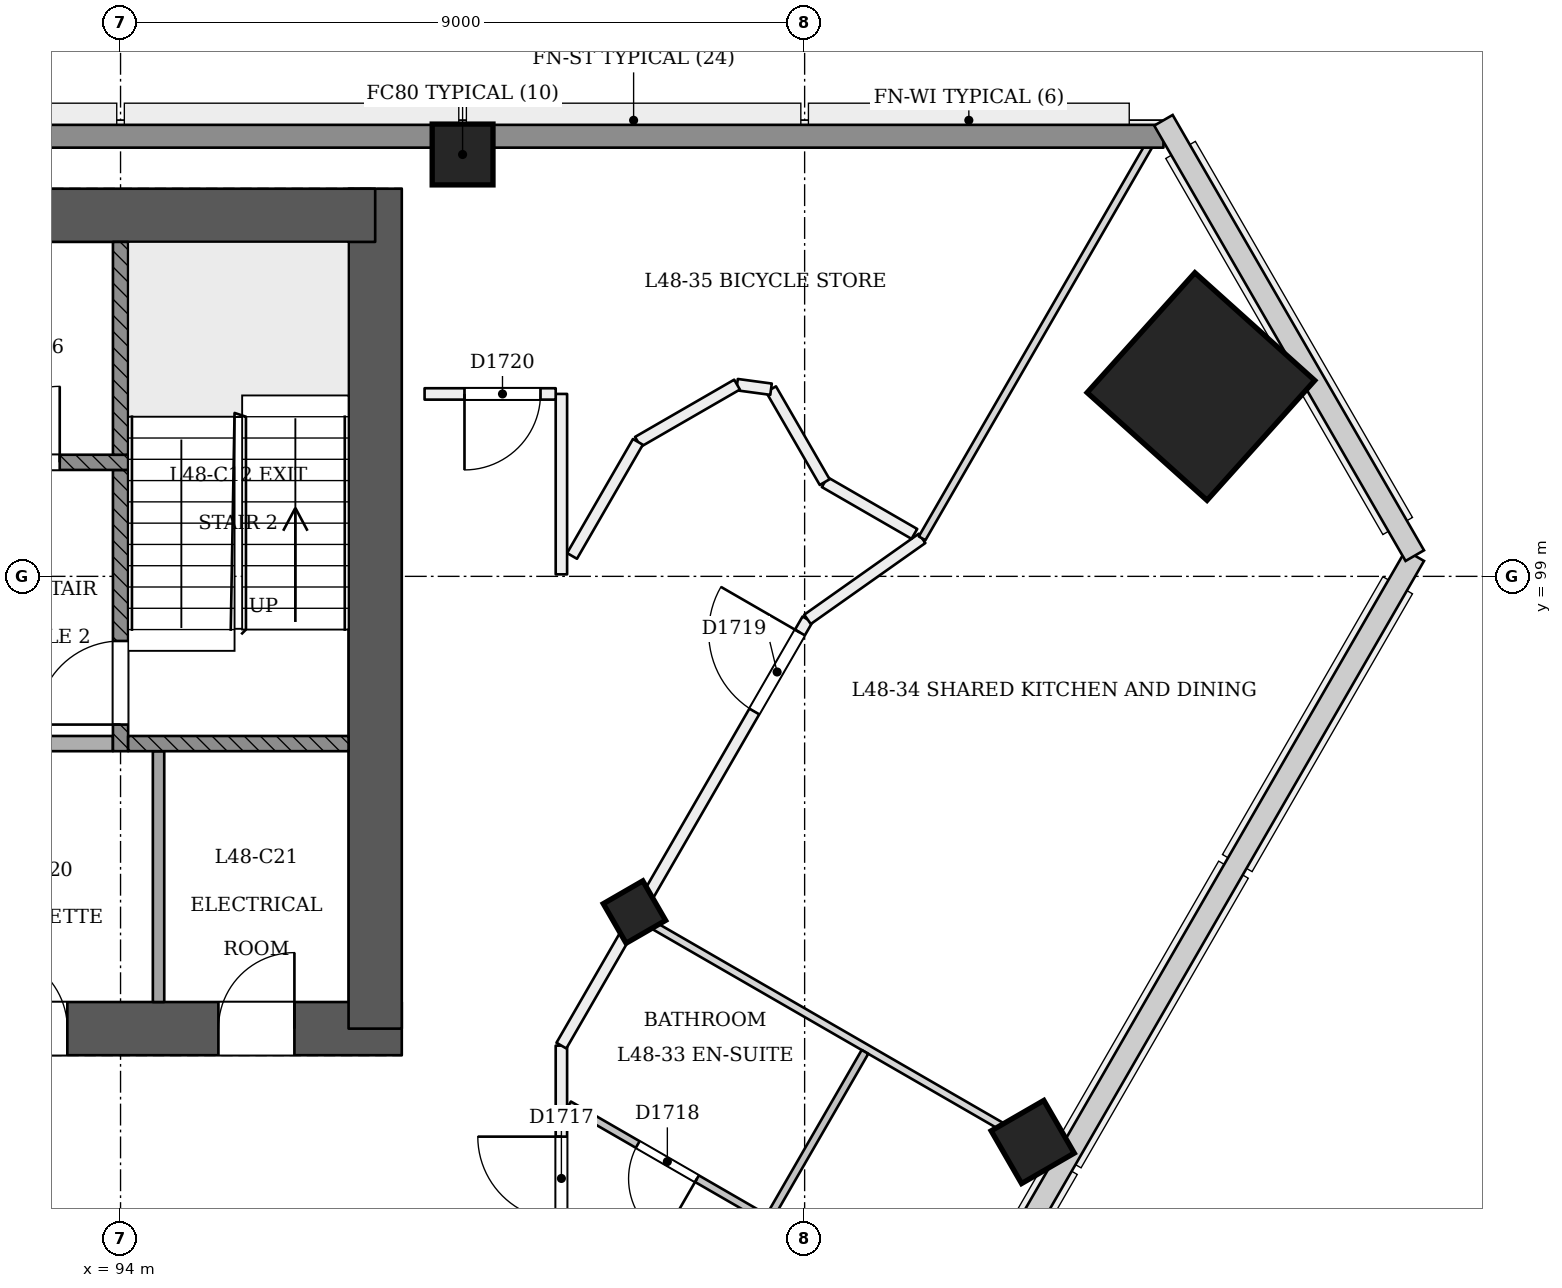
"""IFC4 building model, lengths in metres.
Left out: names, types, materials, properties, quantities, classifications, styles, units other than length and angle.
Written with IfcOpenShell. Run it as: python <this file> out.ifc"""

import sys

from ifc_helpers import new_model, si_unit, direction, frame, frame_2d, origin, origin_2d, place, context, subcontext, project, spatial, rectangle, extrude, element, fill, save


model = new_model("IFC4")
c1 = context("Model", 3, precision=1e-05, world=origin(), true_north=direction((0.0, 1.0)))
c2 = subcontext(c1, "Body", "Model", "MODEL_VIEW")
j1 = project(units=[si_unit("LENGTHUNIT", "METRE"), si_unit("PLANEANGLEUNIT", "RADIAN")], contexts=[c1])
p1 = place(None, origin())
s1 = spatial("IfcSite", under=j1, at=p1, CompositionType="ELEMENT")
p2 = place(p1, origin())
s2 = spatial("IfcBuilding", under=s1, at=p2, CompositionType="ELEMENT")
p3 = place(p2, frame((0.0, 0.0, 185.4)))
s3 = spatial("IfcBuildingStorey", under=s2, at=p3, CompositionType="ELEMENT", Elevation=185.4)
p4 = place(p3, frame((72.65, 93.05, 0.0), z_axis=(0.0, 0.0, 1.0), x_axis=(1.0, 0.0, 0.0)))
e1 = element("IfcWall", 1, at=p4, inside=s3, PredefinedType="SHEAR", context=c2, shape_type="SweptSolid", body=[
    extrude(rectangle(XDim=25.05, YDim=0.7, at=frame_2d((12.525, 0.0))), origin(), (0.0, 0.0, 1.0), 3.6),
])
p5 = place(p4, frame((1.15, 0.0, 0.0)))
e2 = element("IfcOpeningElement", 2, at=p5, cuts=e1, PredefinedType="OPENING", context=c2, shape_type="SweptSolid", body=[
    extrude(rectangle(XDim=1.2, YDim=2.1, at=frame_2d((0.6, 1.05))), frame((0.0, 0.36, 0.0), z_axis=(0.0, -1.0, 0.0), x_axis=(1.0, 0.0, 0.0)), (0.0, 0.0, 1.0), 0.721),
])
p6 = place(p4, frame((3.35, 0.0, 0.0)))
e3 = element("IfcOpeningElement", 3, at=p6, cuts=e1, PredefinedType="OPENING", context=c2, shape_type="SweptSolid", body=[
    extrude(rectangle(XDim=1.2, YDim=2.1, at=frame_2d((0.6, 1.05))), frame((0.0, 0.36, 0.0), z_axis=(0.0, -1.0, 0.0), x_axis=(1.0, 0.0, 0.0)), (0.0, 0.0, 1.0), 0.721),
])
p7 = place(p4, frame((13.35, 0.0, 0.0)))
e4 = element("IfcOpeningElement", 4, at=p7, cuts=e1, PredefinedType="OPENING", context=c2, shape_type="SweptSolid", body=[
    extrude(rectangle(XDim=1.2, YDim=2.1, at=frame_2d((0.6, 1.05))), frame((0.0, 0.36, 0.0), z_axis=(0.0, -1.0, 0.0), x_axis=(1.0, 0.0, 0.0)), (0.0, 0.0, 1.0), 0.721),
])
p8 = place(p4, frame((16.212, 0.0, 0.0)))
e5 = element("IfcOpeningElement", 5, at=p8, cuts=e1, PredefinedType="OPENING", context=c2, shape_type="SweptSolid", body=[
    extrude(rectangle(XDim=1.0, YDim=2.1, at=frame_2d((0.5, 1.05))), frame((0.0, 0.36, 0.0), z_axis=(0.0, -1.0, 0.0), x_axis=(1.0, 0.0, 0.0)), (0.0, 0.0, 1.0), 0.721),
])
p9 = place(p4, frame((19.65, 0.0, 0.0)))
e6 = element("IfcOpeningElement", 6, at=p9, cuts=e1, PredefinedType="OPENING", context=c2, shape_type="SweptSolid", body=[
    extrude(rectangle(XDim=1.0, YDim=2.1, at=frame_2d((0.5, 1.05))), frame((0.0, 0.36, 0.0), z_axis=(0.0, -1.0, 0.0), x_axis=(1.0, 0.0, 0.0)), (0.0, 0.0, 1.0), 0.721),
])
p10 = place(p4, frame((22.637, 0.0, 0.0)))
e7 = element("IfcOpeningElement", 7, at=p10, cuts=e1, PredefinedType="OPENING", context=c2, shape_type="SweptSolid", body=[
    extrude(rectangle(XDim=1.0, YDim=2.1, at=frame_2d((0.5, 1.05))), frame((0.0, 0.36, 0.0), z_axis=(0.0, -1.0, 0.0), x_axis=(1.0, 0.0, 0.0)), (0.0, 0.0, 1.0), 0.721),
])
p11 = place(p3, frame((97.35, 93.05, 0.0), z_axis=(0.0, 0.0, 1.0), x_axis=(0.0, 1.0, 0.0)))
e8 = element("IfcWall", 8, at=p11, inside=s3, PredefinedType="SHEAR", context=c2, shape_type="SweptSolid", body=[
    extrude(rectangle(XDim=11.05, YDim=0.7, at=frame_2d((5.525, 0.0))), origin(), (0.0, 0.0, 1.0), 3.6),
])
p12 = place(p3, frame((97.35, 103.75, 0.0), z_axis=(0.0, 0.0, 1.0), x_axis=(-1.0, 0.0, 0.0)))
e9 = element("IfcWall", 9, at=p12, inside=s3, PredefinedType="SHEAR", context=c2, shape_type="SweptSolid", body=[
    extrude(rectangle(XDim=25.05, YDim=0.7, at=frame_2d((12.525, 0.0))), origin(), (0.0, 0.0, 1.0), 3.6),
])
p13 = place(p3, frame((100.788, 94.537, -0.018), z_axis=(-0.022222852987, 0.038483477124, 0.999012095419), x_axis=(-0.500169973044, -0.865642122652, 0.022219665955)))
e10 = element("IfcColumn", 10, at=p13, inside=s3, PredefinedType="COLUMN", context=c2, shape_type="SweptSolid", body=[
    extrude(rectangle(XDim=0.6, YDim=0.6, at=origin_2d()), origin(), (0.0, 0.0, 1.0), 3.604),
])
p14 = place(p3, frame((108.248, 101.486, 0.0), z_axis=(-0.028334066552, 0.009286524205, 0.999555371723), x_axis=(0.498272954388, -0.866736549779, 0.02217692949)))
e11 = element("IfcColumn", 11, at=p14, inside=s3, PredefinedType="COLUMN", context=c2, shape_type="SweptSolid", body=[
    extrude(rectangle(XDim=2.12, YDim=2.12, at=origin_2d()), origin(), (0.0, 0.0, 1.0), 3.602),
])
p15 = place(p3, frame((98.5, 104.55, 0.0), z_axis=(0.0, 0.0, 1.0), x_axis=(1.0, 0.0, 0.0)))
e12 = element("IfcColumn", 12, at=p15, inside=s3, PredefinedType="COLUMN", context=c2, shape_type="SweptSolid", body=[
    extrude(rectangle(XDim=0.8, YDim=0.8, at=origin_2d()), origin(), (0.0, 0.0, 1.0), 3.6),
])
p16 = place(p3, frame((106.028, 91.511, -0.024), z_axis=(-0.02220780257, 0.038426228083, 0.999014633777), x_axis=(-0.499865129264, -0.865818922715, 0.022191115676)))
e13 = element("IfcColumn", 13, at=p16, inside=s3, PredefinedType="COLUMN", context=c2, shape_type="SweptSolid", body=[
    extrude(rectangle(XDim=0.8, YDim=0.8, at=origin_2d()), origin(), (0.0, 0.0, 1.0), 3.628),
])
p17 = place(p3, frame((99.8, 90.2, 0.0), z_axis=(0.0, 0.0, 1.0), x_axis=(0.0, 1.0, 0.0)))
e14 = element("IfcWall", 14, at=p17, inside=s3, PredefinedType="PARTITIONING", context=c2, shape_type="SweptSolid", body=[
    extrude(rectangle(XDim=2.626, YDim=0.15, at=frame_2d((1.313, 0.0))), origin(), (0.0, 0.0, 1.0), 3.3),
])
p18 = place(p17, frame((0.329, 0.0, 0.0)))
e15 = element("IfcOpeningElement", 15, at=p18, cuts=e14, PredefinedType="OPENING", context=c2, shape_type="SweptSolid", body=[
    extrude(rectangle(XDim=1.1, YDim=2.1, at=frame_2d((0.55, 1.05))), frame((0.0, 0.085, 0.0), z_axis=(0.0, -1.0, 0.0), x_axis=(1.0, 0.0, 0.0)), (0.0, 0.0, 1.0), 0.171),
])
p19 = place(p3, frame((99.8, 92.826, 0.0), z_axis=(0.0, 0.0, 1.0), x_axis=(0.499991148707, 0.866030514021, 0.0)))
e16 = element("IfcWall", 16, at=p19, inside=s3, PredefinedType="PARTITIONING", context=c2, shape_type="SweptSolid", body=[
    extrude(rectangle(XDim=6.476, YDim=0.15, at=frame_2d((3.238, 0.0))), origin(), (0.0, 0.0, 1.0), 2.9),
])
p20 = place(p19, frame((5.076, 0.0, 0.0)))
e17 = element("IfcOpeningElement", 17, at=p20, cuts=e16, PredefinedType="OPENING", context=c2, shape_type="SweptSolid", body=[
    extrude(rectangle(XDim=1.2, YDim=2.1, at=frame_2d((0.6, 1.05))), frame((0.0, 0.085, 0.0), z_axis=(0.0, -1.0, 0.0), x_axis=(1.0, 0.0, 0.0)), (0.0, 0.0, 1.0), 0.171),
])
p21 = place(p3, frame((103.038, 98.435, 0.0), z_axis=(0.0, 0.0, 1.0), x_axis=(0.816601145289, 0.577202364438, 0.0)))
e18 = element("IfcWall", 18, at=p21, inside=s3, PredefinedType="PARTITIONING", context=c2, shape_type="SweptSolid", body=[
    extrude(rectangle(XDim=1.846, YDim=0.15, at=frame_2d((0.923, 0.0))), origin(), (0.0, 0.0, 1.0), 3.3),
])
p22 = place(p3, frame((104.444, 99.559, 0.0), z_axis=(0.0, 0.0, 1.0), x_axis=(-0.866051307416, 0.49995513091, 0.0)))
e19 = element("IfcWall", 19, at=p22, inside=s3, PredefinedType="PARTITIONING", context=c2, shape_type="SweptSolid", body=[
    extrude(rectangle(XDim=1.363, YDim=0.15, at=frame_2d((0.681, 0.0))), origin(), (0.0, 0.0, 1.0), 3.3),
])
p23 = place(p3, frame((103.264, 100.24, 0.0), z_axis=(0.0, 0.0, 1.0), x_axis=(-0.499951990857, 0.866053120102, 0.0)))
e20 = element("IfcWall", 20, at=p23, inside=s3, PredefinedType="PARTITIONING", context=c2, shape_type="SweptSolid", body=[
    extrude(rectangle(XDim=1.412, YDim=0.15, at=frame_2d((0.706, 0.0))), origin(), (0.0, 0.0, 1.0), 3.3),
])
p24 = place(p3, frame((102.558, 101.462, 0.0), z_axis=(0.0, 0.0, 1.0), x_axis=(-0.991104626239, 0.133085009855, 0.0)))
e21 = element("IfcWall", 21, at=p24, inside=s3, PredefinedType="PARTITIONING", context=c2, shape_type="SweptSolid", body=[
    extrude(rectangle(XDim=0.451, YDim=0.15, at=frame_2d((0.226, 0.0))), origin(), (0.0, 0.0, 1.0), 3.3),
])
p25 = place(p3, frame((102.111, 101.522, 0.0), z_axis=(0.0, 0.0, 1.0), x_axis=(-0.866010137527, -0.500026441001, 0.0)))
e22 = element("IfcWall", 22, at=p25, inside=s3, PredefinedType="PARTITIONING", context=c2, shape_type="SweptSolid", body=[
    extrude(rectangle(XDim=1.506, YDim=0.15, at=frame_2d((0.753, 0.0))), origin(), (0.0, 0.0, 1.0), 3.3),
])
p26 = place(p3, frame((100.806, 100.769, 0.0), z_axis=(0.0, 0.0, 1.0), x_axis=(-0.500063959222, -0.865988473761, 0.0)))
e23 = element("IfcWall", 23, at=p26, inside=s3, PredefinedType="PARTITIONING", context=c2, shape_type="SweptSolid", body=[
    extrude(rectangle(XDim=1.733, YDim=0.15, at=frame_2d((0.866, 0.0))), origin(), (0.0, 0.0, 1.0), 3.3),
])
p27 = place(p3, frame((99.8, 99.026, 0.0), z_axis=(0.0, 0.0, 1.0), x_axis=(0.0, 1.0, 0.0)))
e24 = element("IfcWall", 24, at=p27, inside=s3, PredefinedType="PARTITIONING", context=c2, shape_type="SweptSolid", body=[
    extrude(rectangle(XDim=2.374, YDim=0.15, at=frame_2d((1.187, 0.0))), origin(), (0.0, 0.0, 1.0), 3.3),
])
p28 = place(p3, frame((99.725, 101.4, 0.0), z_axis=(0.0, 0.0, 1.0), x_axis=(-1.0, 0.0, 0.0)))
e25 = element("IfcWall", 25, at=p28, inside=s3, PredefinedType="PARTITIONING", context=c2, shape_type="SweptSolid", body=[
    extrude(rectangle(XDim=1.725, YDim=0.15, at=frame_2d((0.863, 0.0))), origin(), (0.0, 0.0, 1.0), 3.3),
])
p29 = place(p28, frame((0.2, 0.0, 0.0)))
e26 = element("IfcOpeningElement", 26, at=p29, cuts=e25, PredefinedType="OPENING", context=c2, shape_type="SweptSolid", body=[
    extrude(rectangle(XDim=1.0, YDim=2.1, at=frame_2d((0.5, 1.05))), frame((0.0, 0.085, 0.0), z_axis=(0.0, -1.0, 0.0), x_axis=(1.0, 0.0, 0.0)), (0.0, 0.0, 1.0), 0.171),
])
p30 = place(p3, frame((103.794, 92.744, 0.0), z_axis=(0.0, 0.0, 1.0), x_axis=(-0.500020783669, -0.866013403995, 0.0)))
e27 = element("IfcWall", 27, at=p30, inside=s3, PredefinedType="PARTITIONING", context=c2, shape_type="SweptSolid", body=[
    extrude(rectangle(XDim=2.55, YDim=0.1, at=frame_2d((1.275, 0.0))), origin(), (0.0, 0.0, 1.0), 2.9),
])
p31 = place(p3, frame((102.519, 90.536, 0.0), z_axis=(0.0, 0.0, 1.0), x_axis=(-0.865998706869, 0.500046237564, 0.0)))
e28 = element("IfcWall", 28, at=p31, inside=s3, PredefinedType="PARTITIONING", context=c2, shape_type="SweptSolid", body=[
    extrude(rectangle(XDim=3.024, YDim=0.1, at=frame_2d((1.512, 0.0))), origin(), (0.0, 0.0, 1.0), 3.3),
])
p32 = place(p31, frame((1.08, 0.0, 0.0)))
e29 = element("IfcOpeningElement", 29, at=p32, cuts=e28, PredefinedType="OPENING", context=c2, shape_type="SweptSolid", body=[
    extrude(rectangle(XDim=0.9, YDim=2.1, at=frame_2d((0.45, 1.05))), frame((0.0, 0.061, 0.0), z_axis=(0.0, -1.0, 0.0), x_axis=(1.0, 0.0, 0.0)), (0.0, 0.0, 1.0), 0.121),
])
p33 = place(p3, frame((106.33, 91.337, 0.0), z_axis=(0.0, 0.0, 1.0), x_axis=(-0.866032601554, 0.49998753289, 0.0)))
e30 = element("IfcWall", 30, at=p33, inside=s3, PredefinedType="PARTITIONING", context=c2, shape_type="SweptSolid", body=[
    extrude(rectangle(XDim=6.325, YDim=0.1, at=frame_2d((3.163, 0.0))), origin(), (0.0, 0.0, 1.0), 2.9),
])
p34 = place(p3, frame((107.663, 104.9, 0.0), z_axis=(0.0, 0.0, 1.0), x_axis=(-0.500004896655, -0.866022576681, 0.0)))
e31 = element("IfcWall", 31, at=p34, inside=s3, PredefinedType="PARTITIONING", context=c2, shape_type="SweptSolid", body=[
    extrude(rectangle(XDim=6.235, YDim=0.1, at=frame_2d((3.118, 0.0))), origin(), (0.0, 0.0, 1.0), 3.3),
])
p35 = place(p3, frame((62.279, 104.79, 0.0), z_axis=(0.0, 0.0, 1.0), x_axis=(1.0, 0.0, 0.0)))
e32 = element("IfcWall", 32, at=p35, inside=s3, PredefinedType="SOLIDWALL", context=c2, shape_type="SweptSolid", body=[
    extrude(rectangle(XDim=45.441, YDim=0.3, at=frame_2d((22.721, 0.0))), origin(), (0.0, 0.0, 1.0), 3.3),
])
p36 = place(p3, frame((94.5, 93.4, 0.0), z_axis=(0.0, 0.0, 1.0), x_axis=(0.0, 1.0, 0.0)))
e33 = element("IfcWall", 33, at=p36, inside=s3, PredefinedType="PARTITIONING", context=c2, shape_type="SweptSolid", body=[
    extrude(rectangle(XDim=3.3, YDim=0.15, at=frame_2d((1.65, 0.0))), origin(), (0.0, 0.0, 1.0), 3.3),
])
p37 = place(p3, frame((91.5, 96.8, 0.0), z_axis=(0.0, 0.0, 1.0), x_axis=(1.0, 0.0, 0.0)))
e34 = element("IfcWall", 34, at=p37, inside=s3, PredefinedType="PARTITIONING", context=c2, shape_type="SweptSolid", body=[
    extrude(rectangle(XDim=2.4, YDim=0.2, at=frame_2d((1.2, 0.0))), origin(), (0.0, 0.0, 1.0), 3.3),
])
p38 = place(p3, frame((94.0, 96.7, 0.0), z_axis=(0.0, 0.0, 1.0), x_axis=(0.0, 1.0, 0.0)))
e35 = element("IfcWall", 35, at=p38, inside=s3, PredefinedType="SOLIDWALL", context=c2, shape_type="SweptSolid", body=[
    extrude(rectangle(XDim=3.7, YDim=0.2, at=frame_2d((1.85, 0.0))), origin(), (0.0, 0.0, 1.0), 3.3),
])
p39 = place(p38, frame((0.35, 0.0, 0.0)))
e36 = element("IfcOpeningElement", 36, at=p39, cuts=e35, PredefinedType="OPENING", context=c2, shape_type="SweptSolid", body=[
    extrude(rectangle(XDim=1.1, YDim=2.1, at=frame_2d((0.55, 1.05))), frame((0.0, 0.11, 0.0), z_axis=(0.0, -1.0, 0.0), x_axis=(1.0, 0.0, 0.0)), (0.0, 0.0, 1.0), 0.221),
])
p40 = place(p3, frame((94.1, 96.8, 0.0), z_axis=(0.0, 0.0, 1.0), x_axis=(1.0, 0.0, 0.0)))
e37 = element("IfcWall", 37, at=p40, inside=s3, PredefinedType="SOLIDWALL", context=c2, shape_type="SweptSolid", body=[
    extrude(rectangle(XDim=2.9, YDim=0.2, at=frame_2d((1.45, 0.0))), origin(), (0.0, 0.0, 1.0), 3.3),
])
p41 = place(p3, frame((75.9, 100.5, 0.0), z_axis=(0.0, 0.0, 1.0), x_axis=(1.0, 0.0, 0.0)))
e38 = element("IfcWall", 38, at=p41, inside=s3, PredefinedType="SOLIDWALL", context=c2, shape_type="SweptSolid", body=[
    extrude(rectangle(XDim=18.2, YDim=0.2, at=frame_2d((9.1, 0.0))), origin(), (0.0, 0.0, 1.0), 3.3),
])
p42 = place(p41, frame((2.6, 0.0, 0.0)))
e39 = element("IfcOpeningElement", 39, at=p42, cuts=e38, PredefinedType="OPENING", context=c2, shape_type="SweptSolid", body=[
    extrude(rectangle(XDim=1.1, YDim=2.1, at=frame_2d((0.55, 1.05))), frame((0.0, 0.11, 0.0), z_axis=(0.0, -1.0, 0.0), x_axis=(1.0, 0.0, 0.0)), (0.0, 0.0, 1.0), 0.221),
])
p43 = place(p41, frame((4.5, 0.0, 0.0)))
e40 = element("IfcOpeningElement", 40, at=p43, cuts=e38, PredefinedType="OPENING", context=c2, shape_type="SweptSolid", body=[
    extrude(rectangle(XDim=1.1, YDim=2.1, at=frame_2d((0.55, 1.05))), frame((0.0, 0.11, 0.0), z_axis=(0.0, -1.0, 0.0), x_axis=(1.0, 0.0, 0.0)), (0.0, 0.0, 1.0), 0.221),
])
p44 = place(p41, frame((6.4, 0.0, 0.0)))
e41 = element("IfcOpeningElement", 41, at=p44, cuts=e38, PredefinedType="OPENING", context=c2, shape_type="SweptSolid", body=[
    extrude(rectangle(XDim=1.1, YDim=2.1, at=frame_2d((0.55, 1.05))), frame((0.0, 0.11, 0.0), z_axis=(0.0, -1.0, 0.0), x_axis=(1.0, 0.0, 0.0)), (0.0, 0.0, 1.0), 0.221),
])
p45 = place(p41, frame((8.3, 0.0, 0.0)))
e42 = element("IfcOpeningElement", 42, at=p45, cuts=e38, PredefinedType="OPENING", context=c2, shape_type="SweptSolid", body=[
    extrude(rectangle(XDim=1.1, YDim=2.1, at=frame_2d((0.55, 1.05))), frame((0.0, 0.11, 0.0), z_axis=(0.0, -1.0, 0.0), x_axis=(1.0, 0.0, 0.0)), (0.0, 0.0, 1.0), 0.221),
])
p46 = place(p41, frame((10.2, 0.0, 0.0)))
e43 = element("IfcOpeningElement", 43, at=p46, cuts=e38, PredefinedType="OPENING", context=c2, shape_type="SweptSolid", body=[
    extrude(rectangle(XDim=1.1, YDim=2.1, at=frame_2d((0.55, 1.05))), frame((0.0, 0.11, 0.0), z_axis=(0.0, -1.0, 0.0), x_axis=(1.0, 0.0, 0.0)), (0.0, 0.0, 1.0), 0.221),
])
p47 = place(p41, frame((12.1, 0.0, 0.0)))
e44 = element("IfcOpeningElement", 44, at=p47, cuts=e38, PredefinedType="OPENING", context=c2, shape_type="SweptSolid", body=[
    extrude(rectangle(XDim=1.1, YDim=2.1, at=frame_2d((0.55, 1.05))), frame((0.0, 0.11, 0.0), z_axis=(0.0, -1.0, 0.0), x_axis=(1.0, 0.0, 0.0)), (0.0, 0.0, 1.0), 0.221),
])
p48 = place(p41, frame((14.0, 0.0, 0.0)))
e45 = element("IfcOpeningElement", 45, at=p48, cuts=e38, PredefinedType="OPENING", context=c2, shape_type="SweptSolid", body=[
    extrude(rectangle(XDim=1.1, YDim=2.1, at=frame_2d((0.55, 1.05))), frame((0.0, 0.11, 0.0), z_axis=(0.0, -1.0, 0.0), x_axis=(1.0, 0.0, 0.0)), (0.0, 0.0, 1.0), 0.221),
])
p49 = place(p41, frame((0.65, 0.0, 0.0)))
e46 = element("IfcOpeningElement", 46, at=p49, cuts=e38, PredefinedType="OPENING", context=c2, shape_type="SweptSolid", body=[
    extrude(rectangle(XDim=1.0, YDim=2.1, at=frame_2d((0.5, 1.05))), frame((0.0, 0.11, 0.0), z_axis=(0.0, -1.0, 0.0), x_axis=(1.0, 0.0, 0.0)), (0.0, 0.0, 1.0), 0.221),
])
p50 = place(p41, frame((16.3, 0.0, 0.0)))
e47 = element("IfcOpeningElement", 47, at=p50, cuts=e38, PredefinedType="OPENING", context=c2, shape_type="SweptSolid", body=[
    extrude(rectangle(XDim=1.0, YDim=2.1, at=frame_2d((0.5, 1.05))), frame((0.0, 0.11, 0.0), z_axis=(0.0, -1.0, 0.0), x_axis=(1.0, 0.0, 0.0)), (0.0, 0.0, 1.0), 0.221),
])
p51 = place(p3, frame((94.0, 100.6, 0.0), z_axis=(0.0, 0.0, 1.0), x_axis=(0.0, 1.0, 0.0)))
e48 = element("IfcWall", 48, at=p51, inside=s3, PredefinedType="SOLIDWALL", context=c2, shape_type="SweptSolid", body=[
    extrude(rectangle(XDim=2.8, YDim=0.2, at=frame_2d((1.4, 0.0))), origin(), (0.0, 0.0, 1.0), 3.3),
])
p52 = place(p18, origin())
e49 = element("IfcDoor", 49, at=p52, inside=s3, OperationType="SINGLE_SWING_RIGHT", PredefinedType="NOTDEFINED", context=c2, shape_type="SweptSolid", body=[
    extrude(rectangle(XDim=1.1, YDim=2.1, at=frame_2d((0.55, 1.05))), frame((0.0, 0.025, 0.0), z_axis=(0.0, -1.0, 0.0), x_axis=(1.0, 0.0, 0.0)), (0.0, 0.0, 1.0), 0.05),
])
fill(e15, e49)
p53 = place(p32, origin())
e50 = element("IfcDoor", 50, at=p53, inside=s3, OperationType="SINGLE_SWING_LEFT", PredefinedType="NOTDEFINED", context=c2, shape_type="SweptSolid", body=[
    extrude(rectangle(XDim=0.9, YDim=2.1, at=frame_2d((0.45, 1.05))), frame((0.0, 0.025, 0.0), z_axis=(0.0, -1.0, 0.0), x_axis=(1.0, 0.0, 0.0)), (0.0, 0.0, 1.0), 0.05),
])
fill(e29, e50)
p54 = place(p20, origin())
e51 = element("IfcDoor", 51, at=p54, inside=s3, OperationType="SINGLE_SWING_RIGHT", PredefinedType="NOTDEFINED", context=c2, shape_type="SweptSolid", body=[
    extrude(rectangle(XDim=1.2, YDim=2.1, at=frame_2d((0.6, 1.05))), frame((0.0, 0.025, 0.0), z_axis=(0.0, -1.0, 0.0), x_axis=(1.0, 0.0, 0.0)), (0.0, 0.0, 1.0), 0.05),
])
fill(e17, e51)
p55 = place(p29, origin())
e52 = element("IfcDoor", 52, at=p55, inside=s3, OperationType="SINGLE_SWING_RIGHT", PredefinedType="NOTDEFINED", context=c2, shape_type="SweptSolid", body=[
    extrude(rectangle(XDim=1.0, YDim=2.1, at=frame_2d((0.5, 1.05))), frame((0.0, 0.025, 0.0), z_axis=(0.0, -1.0, 0.0), x_axis=(1.0, 0.0, 0.0)), (0.0, 0.0, 1.0), 0.05),
])
fill(e26, e52)
p56 = place(p39, origin())
e53 = element("IfcDoor", 53, at=p56, inside=s3, OperationType="SINGLE_SWING_LEFT", PredefinedType="NOTDEFINED", context=c2, shape_type="SweptSolid", body=[
    extrude(rectangle(XDim=1.1, YDim=2.1, at=frame_2d((0.55, 1.05))), frame((0.0, 0.025, 0.0), z_axis=(0.0, -1.0, 0.0), x_axis=(1.0, 0.0, 0.0)), (0.0, 0.0, 1.0), 0.05),
])
fill(e36, e53)
p57 = place(p50, origin())
e54 = element("IfcDoor", 54, at=p57, inside=s3, OperationType="SINGLE_SWING_RIGHT", PredefinedType="NOTDEFINED", context=c2, shape_type="SweptSolid", body=[
    extrude(rectangle(XDim=1.0, YDim=2.1, at=frame_2d((0.5, 1.05))), frame((0.0, 0.025, 0.0), z_axis=(0.0, -1.0, 0.0), x_axis=(1.0, 0.0, 0.0)), (0.0, 0.0, 1.0), 0.05),
])
fill(e47, e54)
p58 = place(p9, origin())
e55 = element("IfcDoor", 55, at=p58, inside=s3, OperationType="SINGLE_SWING_LEFT", PredefinedType="NOTDEFINED", context=c2, shape_type="SweptSolid", body=[
    extrude(rectangle(XDim=1.0, YDim=2.1, at=frame_2d((0.5, 1.05))), frame((0.0, 0.025, 0.0), z_axis=(0.0, -1.0, 0.0), x_axis=(1.0, 0.0, 0.0)), (0.0, 0.0, 1.0), 0.05),
])
fill(e6, e55)
p59 = place(p10, origin())
e56 = element("IfcDoor", 56, at=p59, inside=s3, OperationType="SINGLE_SWING_RIGHT", PredefinedType="NOTDEFINED", context=c2, shape_type="SweptSolid", body=[
    extrude(rectangle(XDim=1.0, YDim=2.1, at=frame_2d((0.5, 1.05))), frame((0.0, 0.025, 0.0), z_axis=(0.0, -1.0, 0.0), x_axis=(1.0, 0.0, 0.0)), (0.0, 0.0, 1.0), 0.05),
])
fill(e7, e56)
save(model, sys.argv[1])
